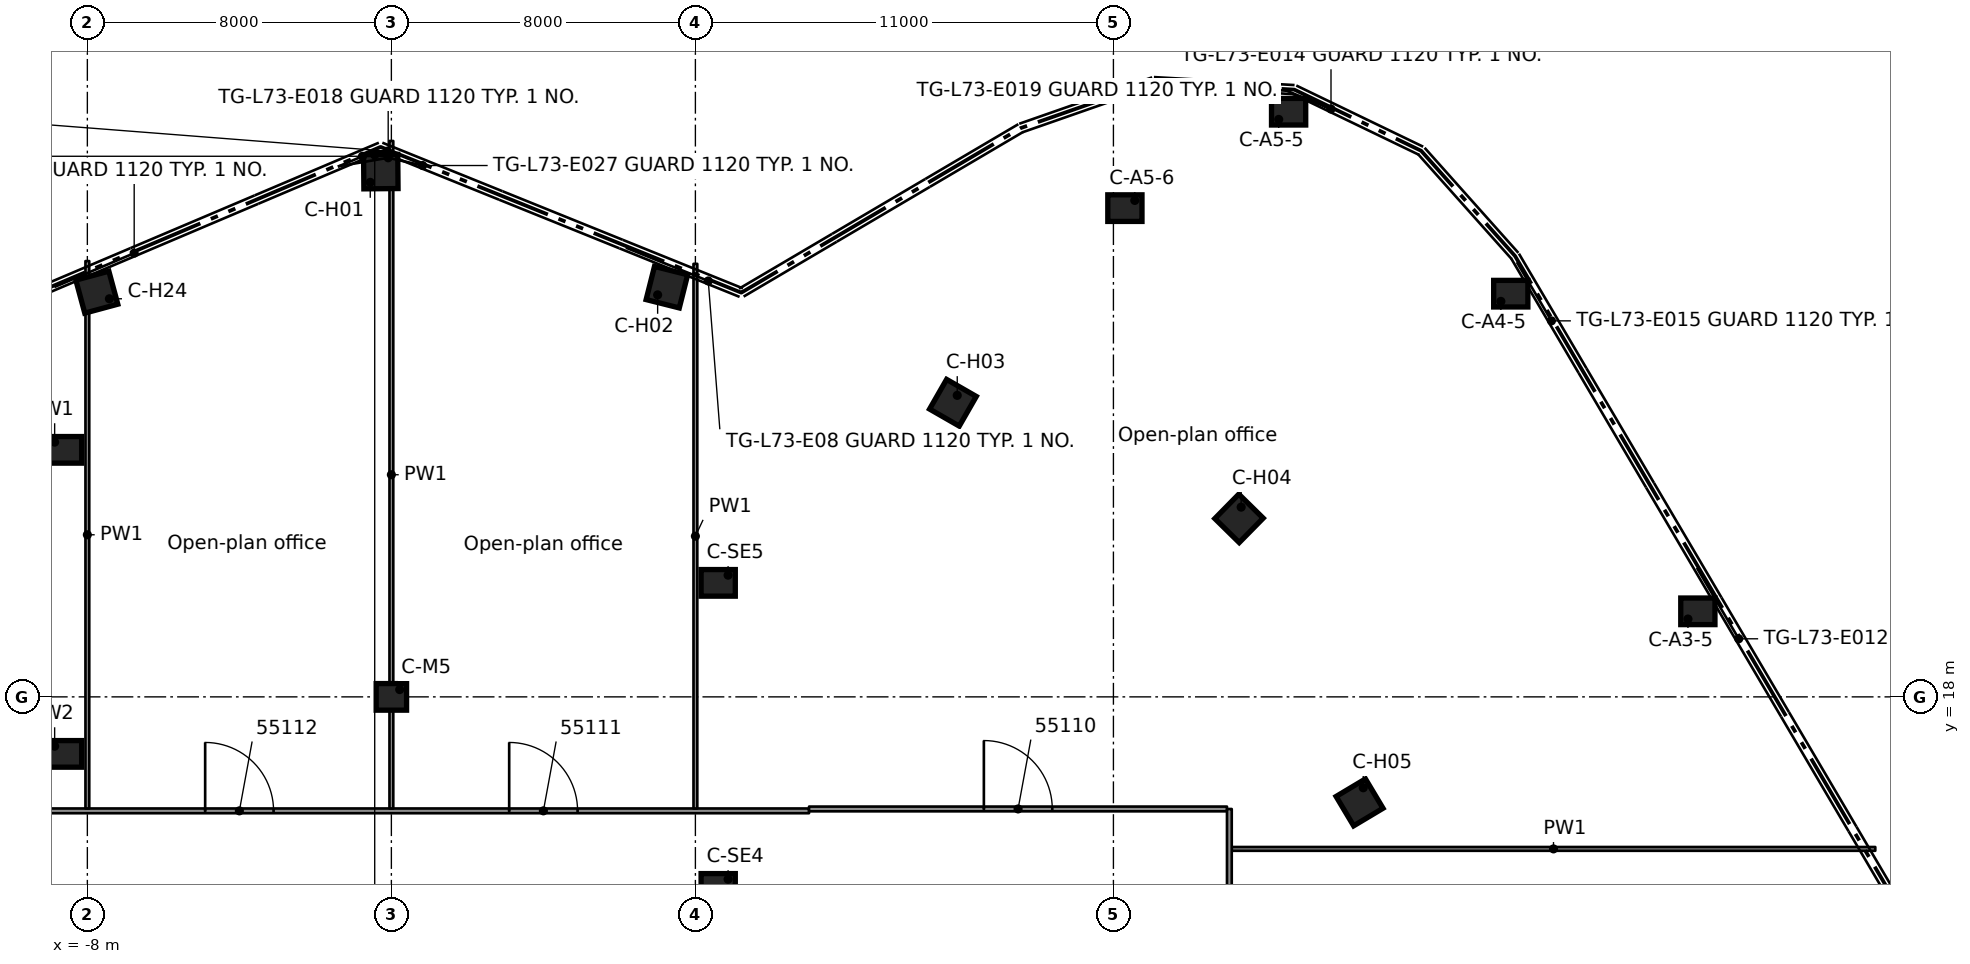
"""IFC4 building model, lengths in metres.
Left out: names, types, materials, properties, quantities, classifications, styles, units other than length and angle.
Written with IfcOpenShell. Run it as: python <this file> out.ifc"""

import sys

from ifc_helpers import new_model, si_unit, direction, frame, frame_2d, origin, origin_2d, place, context, subcontext, project, spatial, rectangle, extrude, element, fill, save


model = new_model("IFC4")
c1 = context("Model", 3, precision=1e-05, world=origin(), true_north=direction((0.0, 1.0)))
c2 = subcontext(c1, "Body", "Model", "MODEL_VIEW")
j1 = project(units=[si_unit("LENGTHUNIT", "METRE"), si_unit("PLANEANGLEUNIT", "RADIAN")], contexts=[c1])
p1 = place(None, origin())
s1 = spatial("IfcSite", under=j1, at=p1, CompositionType="ELEMENT")
p2 = place(p1, origin())
s2 = spatial("IfcBuilding", under=s1, at=p2, CompositionType="ELEMENT")
p3 = place(p2, frame((0.0, 0.0, 275.4)))
s3 = spatial("IfcBuildingStorey", under=s2, at=p3, CompositionType="ELEMENT", Elevation=275.4)
for number, where, z_axis, x_axis in (
    (1, (34.379, 20.251, 0.0), (0.0, 0.0, 1.0), (1.0, 0.0, 0.0)),
    (2, (29.456, 28.609, 0.0), (0.0, 0.0, 1.0), (1.0, 0.0, 0.0)),
    (3, (23.61, 33.397, 0.0), (0.0, 0.0, 1.0), (1.0, 0.0, 0.0)),
    (4, (19.302, 30.86, 0.0), (0.0, 0.0, 1.0), (1.0, 0.0, 0.0)),
):
    element("IfcColumn", number, at=place(p3, frame(where, z_axis=z_axis, x_axis=x_axis)), inside=s3, PredefinedType="COLUMN", context=c2, shape_type="SweptSolid", body=[
        extrude(rectangle(XDim=0.9, YDim=0.7, at=origin_2d()), origin(), (0.0, 0.0, 1.0), 3.5),
    ])
for number, where, z_axis, x_axis in (
    (5, (-0.278, 31.821, 0.0), (0.0, 0.0, 1.0), (-0.009, 1.0, 0.0)),
    (6, (7.25, 28.78, 0.0), (0.0, 0.0, 1.0), (0.244, 0.97, 0.0)),
    (7, (14.777, 25.739, 0.0), (0.0, 0.0, 1.0), (0.498, 0.867, 0.0)),
    (8, (22.305, 22.697, 0.0), (0.0, 0.0, 1.0), (0.701, 0.713, 0.0)),
    (9, (25.477, 15.224, 0.0), (0.0, 0.0, 1.0), (0.858, 0.513, 0.0)),
    (10, (-7.751, 28.649, 0.0), (0.0, 0.0, 1.0), (-0.261, 0.965, 0.0)),
):
    element("IfcColumn", number, at=place(p3, frame(where, z_axis=z_axis, x_axis=x_axis)), inside=s3, PredefinedType="COLUMN", context=c2, shape_type="SweptSolid", body=[
        extrude(rectangle(XDim=0.9, YDim=0.9, at=origin_2d()), origin(), (0.0, 0.0, 1.0), 3.5),
    ])
p4 = place(p3, frame((0.0, 18.0, 0.0), z_axis=(0.0, 0.0, 1.0), x_axis=(1.0, 0.0, 0.0)))
e11 = element("IfcColumn", 11, at=p4, inside=s3, PredefinedType="COLUMN", context=c2, shape_type="SweptSolid", body=[
    extrude(rectangle(XDim=0.8, YDim=0.7, at=origin_2d()), origin(), (0.0, 0.0, 1.0), 3.5),
])
for number, where, z_axis, x_axis in (
    (12, (8.6, 13.0, 0.0), (0.0, 0.0, 1.0), (1.0, 0.0, 0.0)),
    (13, (8.6, 21.0, 0.0), (0.0, 0.0, 1.0), (1.0, 0.0, 0.0)),
    (14, (-8.6, 24.5, 0.0), (0.0, 0.0, 1.0), (1.0, 0.0, 0.0)),
    (15, (-8.6, 16.5, 0.0), (0.0, 0.0, 1.0), (1.0, 0.0, 0.0)),
):
    element("IfcColumn", number, at=place(p3, frame(where, z_axis=z_axis, x_axis=x_axis)), inside=s3, PredefinedType="COLUMN", context=c2, shape_type="SweptSolid", body=[
        extrude(rectangle(XDim=0.9, YDim=0.7, at=origin_2d()), origin(), (0.0, 0.0, 1.0), 3.5),
    ])
p5 = place(p3, frame((22.113, 14.0, 0.0), z_axis=(0.0, 0.0, 1.0), x_axis=(1.0, 0.0, 0.0)))
e16 = element("IfcWall", 16, at=p5, inside=s3, PredefinedType="PARTITIONING", context=c2, shape_type="SweptSolid", body=[
    extrude(rectangle(XDim=16.935, YDim=0.1, at=frame_2d((8.468, 0.0))), origin(), (0.0, 0.0, 1.0), 3.08),
])
p6 = place(p3, frame((-10.349, 15.001, 0.0), z_axis=(0.0, 0.0, 1.0), x_axis=(1.0, 0.0, 0.0)))
e17 = element("IfcWall", 17, at=p6, inside=s3, PredefinedType="PARTITIONING", context=c2, shape_type="SweptSolid", body=[
    extrude(rectangle(XDim=21.339, YDim=0.125, at=frame_2d((10.669, 0.0))), origin(), (0.0, 0.0, 1.0), 3.08),
])
p7 = place(p6, frame((13.449, 0.0, 0.0)))
e18 = element("IfcOpeningElement", 18, at=p7, cuts=e17, PredefinedType="OPENING", context=c2, shape_type="SweptSolid", body=[
    extrude(rectangle(XDim=1.8, YDim=2.1, at=frame_2d((0.9, 1.05))), frame((0.0, 0.073, 0.0), z_axis=(0.0, -1.0, 0.0), x_axis=(1.0, 0.0, 0.0)), (0.0, 0.0, 1.0), 0.145),
])
p8 = place(p6, frame((5.449, 0.0, 0.0)))
e19 = element("IfcOpeningElement", 19, at=p8, cuts=e17, PredefinedType="OPENING", context=c2, shape_type="SweptSolid", body=[
    extrude(rectangle(XDim=1.8, YDim=2.1, at=frame_2d((0.9, 1.05))), frame((0.0, 0.073, 0.0), z_axis=(0.0, -1.0, 0.0), x_axis=(1.0, 0.0, 0.0)), (0.0, 0.0, 1.0), 0.145),
])
p9 = place(p3, frame((10.991, 15.051, 0.0), z_axis=(0.0, 0.0, 1.0), x_axis=(1.0, 0.0, 0.0)))
e20 = element("IfcWall", 20, at=p9, inside=s3, PredefinedType="PARTITIONING", context=c2, shape_type="SweptSolid", body=[
    extrude(rectangle(XDim=10.997, YDim=0.125, at=frame_2d((5.499, 0.0))), origin(), (0.0, 0.0, 1.0), 3.08),
])
p10 = place(p9, frame((4.6, 0.0, 0.0)))
e21 = element("IfcOpeningElement", 21, at=p10, cuts=e20, PredefinedType="OPENING", context=c2, shape_type="SweptSolid", body=[
    extrude(rectangle(XDim=1.8, YDim=2.1, at=frame_2d((0.9, 1.05))), frame((0.0, 0.073, 0.0), z_axis=(0.0, -1.0, 0.0), x_axis=(1.0, 0.0, 0.0)), (0.0, 0.0, 1.0), 0.145),
])
p11 = place(p3, frame((22.051, 15.05, 0.0), z_axis=(0.0, 0.0, 1.0), x_axis=(0.0, -1.0, 0.0)))
e22 = element("IfcWall", 22, at=p11, inside=s3, PredefinedType="PARTITIONING", context=c2, shape_type="SweptSolid", body=[
    extrude(rectangle(XDim=30.1, YDim=0.125, at=frame_2d((15.05, 0.0))), origin(), (0.0, 0.0, 1.0), 3.08),
])
p12 = place(p11, frame((21.65, 0.0, 0.0)))
e23 = element("IfcOpeningElement", 23, at=p12, cuts=e22, PredefinedType="OPENING", context=c2, shape_type="SweptSolid", body=[
    extrude(rectangle(XDim=0.9, YDim=2.1, at=frame_2d((0.45, 1.05))), frame((0.0, 0.073, 0.0), z_axis=(0.0, -1.0, 0.0), x_axis=(1.0, 0.0, 0.0)), (0.0, 0.0, 1.0), 0.145),
])
p13 = place(p11, frame((11.15, 0.0, 0.0)))
e24 = element("IfcOpeningElement", 24, at=p13, cuts=e22, PredefinedType="OPENING", context=c2, shape_type="SweptSolid", body=[
    extrude(rectangle(XDim=0.9, YDim=2.1, at=frame_2d((0.45, 1.05))), frame((0.0, 0.073, 0.0), z_axis=(0.0, -1.0, 0.0), x_axis=(1.0, 0.0, 0.0)), (0.0, 0.0, 1.0), 0.145),
])
p14 = place(p11, frame((3.65, 0.0, 0.0)))
e25 = element("IfcOpeningElement", 25, at=p14, cuts=e22, PredefinedType="OPENING", context=c2, shape_type="SweptSolid", body=[
    extrude(rectangle(XDim=1.8, YDim=2.1, at=frame_2d((0.9, 1.05))), frame((0.0, 0.073, 0.0), z_axis=(0.0, -1.0, 0.0), x_axis=(1.0, 0.0, 0.0)), (0.0, 0.0, 1.0), 0.145),
])
p15 = place(p3, frame((8.0, 15.063, 0.0), z_axis=(0.0, 0.0, 1.0), x_axis=(0.0, 1.0, 0.0)))
e26 = element("IfcWall", 26, at=p15, inside=s3, PredefinedType="PARTITIONING", context=c2, shape_type="SweptSolid", body=[
    extrude(rectangle(XDim=14.331, YDim=0.1, at=frame_2d((7.166, 0.0))), origin(), (0.0, 0.0, 1.0), 3.08),
])
p16 = place(p3, frame((0.0, 15.063, 0.0), z_axis=(0.0, 0.0, 1.0), x_axis=(0.0, 1.0, 0.0)))
e27 = element("IfcWall", 27, at=p16, inside=s3, PredefinedType="PARTITIONING", context=c2, shape_type="SweptSolid", body=[
    extrude(rectangle(XDim=17.564, YDim=0.1, at=frame_2d((8.782, 0.0))), origin(), (0.0, 0.0, 1.0), 3.08),
])
p17 = place(p3, frame((-8.0, 15.063, 0.0), z_axis=(0.0, 0.0, 1.0), x_axis=(0.0, 1.0, 0.0)))
e28 = element("IfcWall", 28, at=p17, inside=s3, PredefinedType="PARTITIONING", context=c2, shape_type="SweptSolid", body=[
    extrude(rectangle(XDim=14.404, YDim=0.1, at=frame_2d((7.202, 0.0))), origin(), (0.0, 0.0, 1.0), 3.08),
])
p18 = place(p10, origin())
e29 = element("IfcDoor", 29, at=p18, inside=s3, OperationType="DOUBLE_DOOR_SINGLE_SWING", PredefinedType="DOOR", context=c2, shape_type="SweptSolid", body=[
    extrude(rectangle(XDim=1.8, YDim=2.1, at=frame_2d((0.9, 1.05))), frame((0.0, 0.025, 0.0), z_axis=(0.0, -1.0, 0.0), x_axis=(1.0, 0.0, 0.0)), (0.0, 0.0, 1.0), 0.05),
])
fill(e21, e29)
p19 = place(p7, origin())
e30 = element("IfcDoor", 30, at=p19, inside=s3, OperationType="DOUBLE_DOOR_SINGLE_SWING", PredefinedType="DOOR", context=c2, shape_type="SweptSolid", body=[
    extrude(rectangle(XDim=1.8, YDim=2.1, at=frame_2d((0.9, 1.05))), frame((0.0, 0.025, 0.0), z_axis=(0.0, -1.0, 0.0), x_axis=(1.0, 0.0, 0.0)), (0.0, 0.0, 1.0), 0.05),
])
fill(e18, e30)
p20 = place(p8, origin())
e31 = element("IfcDoor", 31, at=p20, inside=s3, OperationType="DOUBLE_DOOR_SINGLE_SWING", PredefinedType="DOOR", context=c2, shape_type="SweptSolid", body=[
    extrude(rectangle(XDim=1.8, YDim=2.1, at=frame_2d((0.9, 1.05))), frame((0.0, 0.025, 0.0), z_axis=(0.0, -1.0, 0.0), x_axis=(1.0, 0.0, 0.0)), (0.0, 0.0, 1.0), 0.05),
])
fill(e19, e31)
save(model, sys.argv[1])
